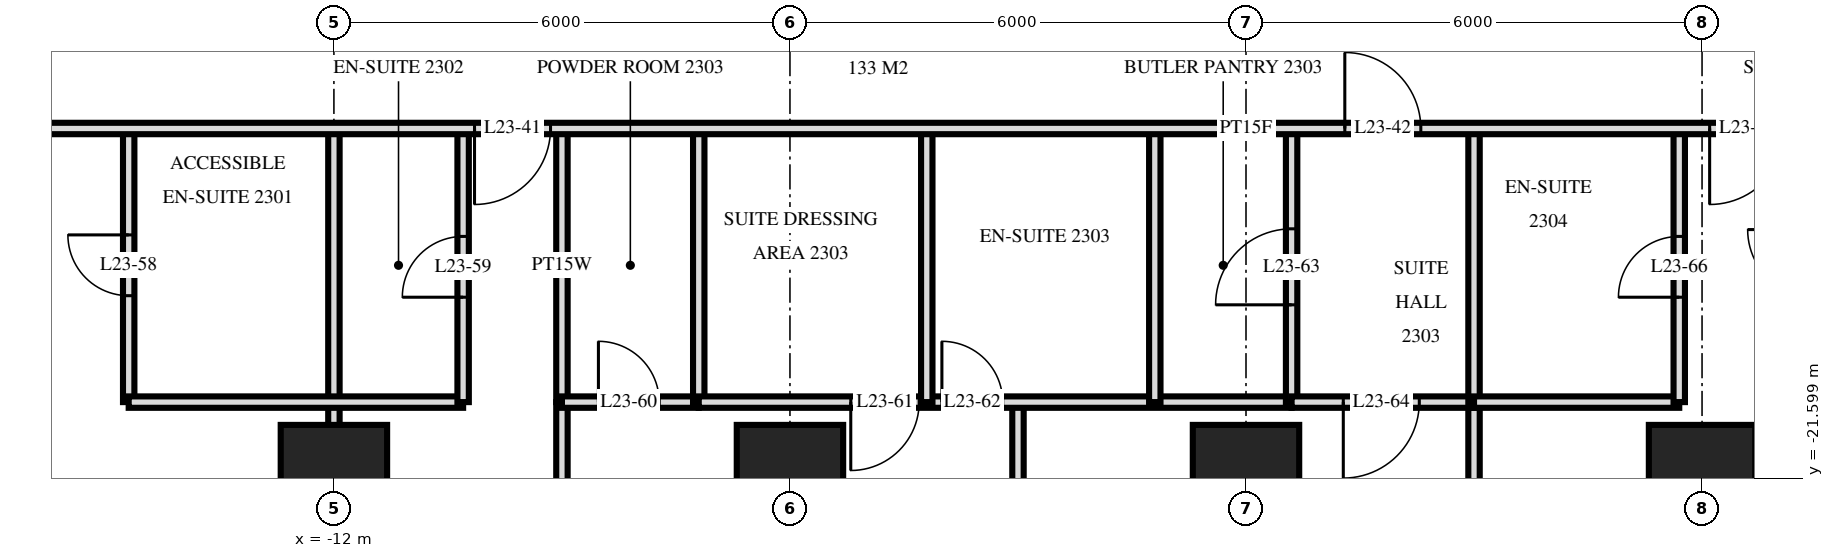
"""IFC4 building model, lengths in metres.
Left out: names, types, materials, properties, quantities, classifications, styles, units other than length and angle.
Written with IfcOpenShell. Run it as: python <this file> out.ifc"""

import sys

from ifc_helpers import new_model, si_unit, direction, frame, frame_2d, origin, origin_2d, place, context, subcontext, project, spatial, rectangle, extrude, element, fill, save


model = new_model("IFC4")
c1 = context("Model", 3, precision=1e-05, world=origin(), true_north=direction((0.0, 1.0)))
c2 = subcontext(c1, "Body", "Model", "MODEL_VIEW")
j1 = project(units=[si_unit("LENGTHUNIT", "METRE"), si_unit("PLANEANGLEUNIT", "RADIAN")], contexts=[c1])
p1 = place(None, origin())
s1 = spatial("IfcSite", under=j1, at=p1, CompositionType="ELEMENT")
p2 = place(p1, origin())
s2 = spatial("IfcBuilding", under=s1, at=p2, CompositionType="ELEMENT")
p3 = place(p2, frame((0.0, 0.0, 92.4)))
s3 = spatial("IfcBuildingStorey", under=s2, at=p3, CompositionType="ELEMENT", Elevation=92.4)
for number, where, z_axis, x_axis in (
    (1, (-12.0, -21.6, 0.0), (0.0, 0.0, 1.0), (1.0, 0.0, 0.0)),
    (2, (-6.0, -21.6, 0.0), (0.0, 0.0, 1.0), (1.0, 0.0, 0.0)),
    (3, (0.0, -21.6, 0.0), (0.0, 0.0, 1.0), (1.0, 0.0, 0.0)),
    (4, (6.0, -21.6, 0.0), (0.0, 0.0, 1.0), (1.0, 0.0, 0.0)),
):
    element("IfcColumn", number, at=place(p3, frame(where, z_axis=z_axis, x_axis=x_axis)), inside=s3, PredefinedType="COLUMN", context=c2, shape_type="SweptSolid", body=[
        extrude(rectangle(XDim=1.4, YDim=1.4, at=origin_2d()), origin(), (0.0, 0.0, 1.0), 3.6),
    ])
p4 = place(p3, frame((5.7, -20.6, 0.0), z_axis=(0.0, 0.0, 1.0), x_axis=(0.0, 1.0, 0.0)))
e5 = element("IfcWall", 5, at=p4, inside=s3, PredefinedType="PARTITIONING", context=c2, shape_type="SweptSolid", body=[
    extrude(rectangle(XDim=3.6, YDim=0.15, at=frame_2d((1.8, 0.0))), origin(), (0.0, 0.0, 1.0), 3.32),
])
p5 = place(p4, frame((1.38, 0.0, 0.0)))
e6 = element("IfcOpeningElement", 6, at=p5, cuts=e5, PredefinedType="OPENING", context=c2, shape_type="SweptSolid", body=[
    extrude(rectangle(XDim=0.8, YDim=2.1, at=frame_2d((0.4, 1.05))), frame((0.0, 0.085, 0.0), z_axis=(0.0, -1.0, 0.0), x_axis=(1.0, 0.0, 0.0)), (0.0, 0.0, 1.0), 0.17),
])
p6 = place(p3, frame((3.0, -20.6, 0.0), z_axis=(0.0, 0.0, 1.0), x_axis=(0.0, 1.0, 0.0)))
e7 = element("IfcWall", 7, at=p6, inside=s3, PredefinedType="PARTITIONING", context=c2, shape_type="SweptSolid", body=[
    extrude(rectangle(XDim=3.6, YDim=0.15, at=frame_2d((1.8, 0.0))), origin(), (0.0, 0.0, 1.0), 3.32),
])
p7 = place(p3, frame((3.0, -29.22, 0.0), z_axis=(0.0, 0.0, 1.0), x_axis=(0.0, 1.0, 0.0)))
e8 = element("IfcWall", 8, at=p7, inside=s3, PredefinedType="PARTITIONING", context=c2, shape_type="SweptSolid", body=[
    extrude(rectangle(XDim=8.62, YDim=0.15, at=frame_2d((4.31, 0.0))), origin(), (0.0, 0.0, 1.0), 3.32),
])
p8 = place(p3, frame((0.6, -20.6, 0.0), z_axis=(0.0, 0.0, 1.0), x_axis=(0.0, 1.0, 0.0)))
e9 = element("IfcWall", 9, at=p8, inside=s3, PredefinedType="PARTITIONING", context=c2, shape_type="SweptSolid", body=[
    extrude(rectangle(XDim=3.6, YDim=0.15, at=frame_2d((1.8, 0.0))), origin(), (0.0, 0.0, 1.0), 3.32),
])
p9 = place(p8, frame((1.28, 0.0, 0.0)))
e10 = element("IfcOpeningElement", 10, at=p9, cuts=e9, PredefinedType="OPENING", context=c2, shape_type="SweptSolid", body=[
    extrude(rectangle(XDim=1.0, YDim=2.1, at=frame_2d((0.5, 1.05))), frame((0.0, 0.085, 0.0), z_axis=(0.0, -1.0, 0.0), x_axis=(1.0, 0.0, 0.0)), (0.0, 0.0, 1.0), 0.17),
])
p10 = place(p3, frame((-1.2, -20.6, 0.0), z_axis=(0.0, 0.0, 1.0), x_axis=(0.0, 1.0, 0.0)))
e11 = element("IfcWall", 11, at=p10, inside=s3, PredefinedType="PARTITIONING", context=c2, shape_type="SweptSolid", body=[
    extrude(rectangle(XDim=3.6, YDim=0.15, at=frame_2d((1.8, 0.0))), origin(), (0.0, 0.0, 1.0), 3.32),
])
p11 = place(p3, frame((-3.0, -29.22, 0.0), z_axis=(0.0, 0.0, 1.0), x_axis=(0.0, 1.0, 0.0)))
e12 = element("IfcWall", 12, at=p11, inside=s3, PredefinedType="PARTITIONING", context=c2, shape_type="SweptSolid", body=[
    extrude(rectangle(XDim=8.62, YDim=0.15, at=frame_2d((4.31, 0.0))), origin(), (0.0, 0.0, 1.0), 3.32),
])
p12 = place(p11, frame((3.77, 0.0, 0.0)))
e13 = element("IfcOpeningElement", 13, at=p12, cuts=e12, PredefinedType="OPENING", context=c2, shape_type="SweptSolid", body=[
    extrude(rectangle(XDim=0.9, YDim=2.1, at=frame_2d((0.45, 1.05))), frame((0.0, 0.085, 0.0), z_axis=(0.0, -1.0, 0.0), x_axis=(1.0, 0.0, 0.0)), (0.0, 0.0, 1.0), 0.17),
])
p13 = place(p3, frame((-4.2, -20.6, 0.0), z_axis=(0.0, 0.0, 1.0), x_axis=(0.0, 1.0, 0.0)))
e14 = element("IfcWall", 14, at=p13, inside=s3, PredefinedType="PARTITIONING", context=c2, shape_type="SweptSolid", body=[
    extrude(rectangle(XDim=3.6, YDim=0.15, at=frame_2d((1.8, 0.0))), origin(), (0.0, 0.0, 1.0), 3.32),
])
p14 = place(p3, frame((-7.2, -20.6, 0.0), z_axis=(0.0, 0.0, 1.0), x_axis=(0.0, 1.0, 0.0)))
e15 = element("IfcWall", 15, at=p14, inside=s3, PredefinedType="PLUMBINGWALL", context=c2, shape_type="SweptSolid", body=[
    extrude(rectangle(XDim=3.6, YDim=0.15, at=frame_2d((1.8, 0.0))), origin(), (0.0, 0.0, 1.0), 3.32),
])
p15 = place(p3, frame((-9.0, -29.22, 0.0), z_axis=(0.0, 0.0, 1.0), x_axis=(0.0, 1.0, 0.0)))
e16 = element("IfcWall", 16, at=p15, inside=s3, PredefinedType="PARTITIONING", context=c2, shape_type="SweptSolid", body=[
    extrude(rectangle(XDim=8.62, YDim=0.15, at=frame_2d((4.31, 0.0))), origin(), (0.0, 0.0, 1.0), 3.32),
])
p16 = place(p3, frame((-9.0, -20.6, 0.0), z_axis=(0.0, 0.0, 1.0), x_axis=(0.0, 1.0, 0.0)))
e17 = element("IfcWall", 17, at=p16, inside=s3, PredefinedType="PLUMBINGWALL", context=c2, shape_type="SweptSolid", body=[
    extrude(rectangle(XDim=3.6, YDim=0.15, at=frame_2d((1.8, 0.0))), origin(), (0.0, 0.0, 1.0), 3.32),
])
p17 = place(p3, frame((-10.3, -20.6, 0.0), z_axis=(0.0, 0.0, 1.0), x_axis=(0.0, 1.0, 0.0)))
e18 = element("IfcWall", 18, at=p17, inside=s3, PredefinedType="PARTITIONING", context=c2, shape_type="SweptSolid", body=[
    extrude(rectangle(XDim=3.6, YDim=0.15, at=frame_2d((1.8, 0.0))), origin(), (0.0, 0.0, 1.0), 3.32),
])
p18 = place(p17, frame((1.38, 0.0, 0.0)))
e19 = element("IfcOpeningElement", 19, at=p18, cuts=e18, PredefinedType="OPENING", context=c2, shape_type="SweptSolid", body=[
    extrude(rectangle(XDim=0.8, YDim=2.1, at=frame_2d((0.4, 1.05))), frame((0.0, 0.085, 0.0), z_axis=(0.0, -1.0, 0.0), x_axis=(1.0, 0.0, 0.0)), (0.0, 0.0, 1.0), 0.17),
])
p19 = place(p3, frame((-12.0, -29.22, 0.0), z_axis=(0.0, 0.0, 1.0), x_axis=(0.0, 1.0, 0.0)))
e20 = element("IfcWall", 20, at=p19, inside=s3, PredefinedType="PARTITIONING", context=c2, shape_type="SweptSolid", body=[
    extrude(rectangle(XDim=12.22, YDim=0.15, at=frame_2d((6.11, 0.0))), origin(), (0.0, 0.0, 1.0), 3.32),
])
p20 = place(p3, frame((-14.7, -20.6, 0.0), z_axis=(0.0, 0.0, 1.0), x_axis=(0.0, 1.0, 0.0)))
e21 = element("IfcWall", 21, at=p20, inside=s3, PredefinedType="PARTITIONING", context=c2, shape_type="SweptSolid", body=[
    extrude(rectangle(XDim=3.6, YDim=0.15, at=frame_2d((1.8, 0.0))), origin(), (0.0, 0.0, 1.0), 3.32),
])
p21 = place(p20, frame((1.4, 0.0, 0.0)))
e22 = element("IfcOpeningElement", 22, at=p21, cuts=e21, PredefinedType="OPENING", context=c2, shape_type="SweptSolid", body=[
    extrude(rectangle(XDim=0.8, YDim=2.1, at=frame_2d((0.4, 1.05))), frame((0.0, 0.085, 0.0), z_axis=(0.0, -1.0, 0.0), x_axis=(1.0, 0.0, 0.0)), (0.0, 0.0, 1.0), 0.17),
])
p22 = place(p3, frame((0.6, -20.6, 0.0), z_axis=(0.0, 0.0, 1.0), x_axis=(1.0, 0.0, 0.0)))
e23 = element("IfcWall", 23, at=p22, inside=s3, PredefinedType="PARTITIONING", context=c2, shape_type="SweptSolid", body=[
    extrude(rectangle(XDim=2.4, YDim=0.15, at=frame_2d((1.2, 0.0))), origin(), (0.0, 0.0, 1.0), 3.32),
])
p23 = place(p22, frame((0.68, 0.0, 0.0)))
e24 = element("IfcOpeningElement", 24, at=p23, cuts=e23, PredefinedType="OPENING", context=c2, shape_type="SweptSolid", body=[
    extrude(rectangle(XDim=1.0, YDim=2.1, at=frame_2d((0.5, 1.05))), frame((0.0, 0.085, 0.0), z_axis=(0.0, -1.0, 0.0), x_axis=(1.0, 0.0, 0.0)), (0.0, 0.0, 1.0), 0.17),
])
p24 = place(p3, frame((-14.7, -20.6, 0.0), z_axis=(0.0, 0.0, 1.0), x_axis=(1.0, 0.0, 0.0)))
e25 = element("IfcWall", 25, at=p24, inside=s3, PredefinedType="PARTITIONING", context=c2, shape_type="SweptSolid", body=[
    extrude(rectangle(XDim=4.4, YDim=0.15, at=frame_2d((2.2, 0.0))), origin(), (0.0, 0.0, 1.0), 3.32),
])
p25 = place(p3, frame((-7.2, -20.6, 0.0), z_axis=(0.0, 0.0, 1.0), x_axis=(1.0, 0.0, 0.0)))
e26 = element("IfcWall", 26, at=p25, inside=s3, PredefinedType="PARTITIONING", context=c2, shape_type="SweptSolid", body=[
    extrude(rectangle(XDim=7.8, YDim=0.15, at=frame_2d((3.9, 0.0))), origin(), (0.0, 0.0, 1.0), 3.32),
])
p26 = place(p25, frame((2.0, 0.0, 0.0)))
e27 = element("IfcOpeningElement", 27, at=p26, cuts=e26, PredefinedType="OPENING", context=c2, shape_type="SweptSolid", body=[
    extrude(rectangle(XDim=0.9, YDim=2.1, at=frame_2d((0.45, 1.05))), frame((0.0, 0.085, 0.0), z_axis=(0.0, -1.0, 0.0), x_axis=(1.0, 0.0, 0.0)), (0.0, 0.0, 1.0), 0.17),
])
p27 = place(p25, frame((3.199, 0.0, 0.0)))
e28 = element("IfcOpeningElement", 28, at=p27, cuts=e26, PredefinedType="OPENING", context=c2, shape_type="SweptSolid", body=[
    extrude(rectangle(XDim=0.8, YDim=2.1, at=frame_2d((0.4, 1.05))), frame((0.0, 0.085, 0.0), z_axis=(0.0, -1.0, 0.0), x_axis=(1.0, 0.0, 0.0)), (0.0, 0.0, 1.0), 0.17),
])
p28 = place(p3, frame((3.0, -20.6, 0.0), z_axis=(0.0, 0.0, 1.0), x_axis=(1.0, 0.0, 0.0)))
e29 = element("IfcWall", 29, at=p28, inside=s3, PredefinedType="PARTITIONING", context=c2, shape_type="SweptSolid", body=[
    extrude(rectangle(XDim=2.7, YDim=0.15, at=frame_2d((1.35, 0.0))), origin(), (0.0, 0.0, 1.0), 3.32),
])
p29 = place(p3, frame((-9.0, -20.6, 0.0), z_axis=(0.0, 0.0, 1.0), x_axis=(1.0, 0.0, 0.0)))
e30 = element("IfcWall", 30, at=p29, inside=s3, PredefinedType="PLUMBINGWALL", context=c2, shape_type="SweptSolid", body=[
    extrude(rectangle(XDim=1.8, YDim=0.15, at=frame_2d((0.9, 0.0))), origin(), (0.0, 0.0, 1.0), 3.32),
])
p30 = place(p29, frame((0.48, 0.0, 0.0)))
e31 = element("IfcOpeningElement", 31, at=p30, cuts=e30, PredefinedType="OPENING", context=c2, shape_type="SweptSolid", body=[
    extrude(rectangle(XDim=0.8, YDim=2.1, at=frame_2d((0.4, 1.05))), frame((0.0, 0.085, 0.0), z_axis=(0.0, -1.0, 0.0), x_axis=(1.0, 0.0, 0.0)), (0.0, 0.0, 1.0), 0.17),
])
p31 = place(p3, frame((-33.12, -17.0, 0.0), z_axis=(0.0, 0.0, 1.0), x_axis=(1.0, 0.0, 0.0)))
e32 = element("IfcWall", 32, at=p31, inside=s3, PredefinedType="PARTITIONING", context=c2, shape_type="SweptSolid", body=[
    extrude(rectangle(XDim=66.24, YDim=0.15, at=frame_2d((33.12, 0.0))), origin(), (0.0, 0.0, 1.0), 3.32),
])
p32 = place(p31, frame((16.27, 0.0, 0.0)))
e33 = element("IfcOpeningElement", 33, at=p32, cuts=e32, PredefinedType="OPENING", context=c2, shape_type="SweptSolid", body=[
    extrude(rectangle(XDim=1.0, YDim=2.1, at=frame_2d((0.5, 1.05))), frame((0.0, 0.085, 0.0), z_axis=(0.0, -1.0, 0.0), x_axis=(1.0, 0.0, 0.0)), (0.0, 0.0, 1.0), 0.17),
])
p33 = place(p31, frame((22.97, 0.0, 0.0)))
e34 = element("IfcOpeningElement", 34, at=p33, cuts=e32, PredefinedType="OPENING", context=c2, shape_type="SweptSolid", body=[
    extrude(rectangle(XDim=1.0, YDim=2.1, at=frame_2d((0.5, 1.05))), frame((0.0, 0.085, 0.0), z_axis=(0.0, -1.0, 0.0), x_axis=(1.0, 0.0, 0.0)), (0.0, 0.0, 1.0), 0.17),
])
p34 = place(p31, frame((34.42, 0.0, 0.0)))
e35 = element("IfcOpeningElement", 35, at=p34, cuts=e32, PredefinedType="OPENING", context=c2, shape_type="SweptSolid", body=[
    extrude(rectangle(XDim=1.0, YDim=2.1, at=frame_2d((0.5, 1.05))), frame((0.0, 0.085, 0.0), z_axis=(0.0, -1.0, 0.0), x_axis=(1.0, 0.0, 0.0)), (0.0, 0.0, 1.0), 0.17),
])
p35 = place(p31, frame((39.22, 0.0, 0.0)))
e36 = element("IfcOpeningElement", 36, at=p35, cuts=e32, PredefinedType="OPENING", context=c2, shape_type="SweptSolid", body=[
    extrude(rectangle(XDim=1.0, YDim=2.1, at=frame_2d((0.5, 1.05))), frame((0.0, 0.085, 0.0), z_axis=(0.0, -1.0, 0.0), x_axis=(1.0, 0.0, 0.0)), (0.0, 0.0, 1.0), 0.17),
])
p36 = place(p31, frame((42.27, 0.0, 0.0)))
e37 = element("IfcOpeningElement", 37, at=p36, cuts=e32, PredefinedType="OPENING", context=c2, shape_type="SweptSolid", body=[
    extrude(rectangle(XDim=1.0, YDim=2.1, at=frame_2d((0.5, 1.05))), frame((0.0, 0.085, 0.0), z_axis=(0.0, -1.0, 0.0), x_axis=(1.0, 0.0, 0.0)), (0.0, 0.0, 1.0), 0.17),
])
p37 = place(p31, frame((45.82, 0.0, 0.0)))
e38 = element("IfcOpeningElement", 38, at=p37, cuts=e32, PredefinedType="OPENING", context=c2, shape_type="SweptSolid", body=[
    extrude(rectangle(XDim=1.0, YDim=2.1, at=frame_2d((0.5, 1.05))), frame((0.0, 0.085, 0.0), z_axis=(0.0, -1.0, 0.0), x_axis=(1.0, 0.0, 0.0)), (0.0, 0.0, 1.0), 0.17),
])
p38 = place(p31, frame((13.42, 0.0, 0.0)))
e39 = element("IfcOpeningElement", 39, at=p38, cuts=e32, PredefinedType="OPENING", context=c2, shape_type="SweptSolid", body=[
    extrude(rectangle(XDim=1.0, YDim=2.1, at=frame_2d((0.5, 1.05))), frame((0.0, 0.085, 0.0), z_axis=(0.0, -1.0, 0.0), x_axis=(1.0, 0.0, 0.0)), (0.0, 0.0, 1.0), 0.17),
])
p39 = place(p31, frame((54.82, 0.0, 0.0)))
e40 = element("IfcOpeningElement", 40, at=p39, cuts=e32, PredefinedType="OPENING", context=c2, shape_type="SweptSolid", body=[
    extrude(rectangle(XDim=1.0, YDim=2.1, at=frame_2d((0.5, 1.05))), frame((0.0, 0.085, 0.0), z_axis=(0.0, -1.0, 0.0), x_axis=(1.0, 0.0, 0.0)), (0.0, 0.0, 1.0), 0.17),
])
p40 = place(p33, frame((0.5, 0.0, 0.0), z_axis=(0.0, 0.0, 1.0), x_axis=(-1.0, 0.0, 0.0)))
e41 = element("IfcDoor", 41, at=p40, inside=s3, OperationType="SINGLE_SWING_LEFT", PredefinedType="DOOR", context=c2, shape_type="SweptSolid", body=[
    extrude(rectangle(XDim=1.0, YDim=2.1, at=frame_2d((0.0, 1.05))), frame((0.0, -0.025, 0.0), z_axis=(0.0, 1.0, 0.0), x_axis=(-1.0, 0.0, 0.0)), (0.0, 0.0, 1.0), 0.05),
])
fill(e34, e41)
p41 = place(p34, origin())
e42 = element("IfcDoor", 42, at=p41, inside=s3, OperationType="SINGLE_SWING_RIGHT", PredefinedType="DOOR", context=c2, shape_type="SweptSolid", body=[
    extrude(rectangle(XDim=1.0, YDim=2.1, at=frame_2d((0.5, 1.05))), frame((0.0, 0.025, 0.0), z_axis=(0.0, -1.0, 0.0), x_axis=(1.0, 0.0, 0.0)), (0.0, 0.0, 1.0), 0.05),
])
fill(e35, e42)
p42 = place(p35, frame((0.5, 0.0, 0.0), z_axis=(0.0, 0.0, 1.0), x_axis=(-1.0, 0.0, 0.0)))
e43 = element("IfcDoor", 43, at=p42, inside=s3, OperationType="SINGLE_SWING_LEFT", PredefinedType="DOOR", context=c2, shape_type="SweptSolid", body=[
    extrude(rectangle(XDim=1.0, YDim=2.1, at=frame_2d((0.0, 1.05))), frame((0.0, -0.025, 0.0), z_axis=(0.0, 1.0, 0.0), x_axis=(-1.0, 0.0, 0.0)), (0.0, 0.0, 1.0), 0.05),
])
fill(e36, e43)
p43 = place(p21, origin())
e44 = element("IfcDoor", 44, at=p43, inside=s3, OperationType="SINGLE_SWING_LEFT", PredefinedType="DOOR", context=c2, shape_type="SweptSolid", body=[
    extrude(rectangle(XDim=0.8, YDim=2.1, at=frame_2d((0.4, 1.05))), frame((0.0, 0.025, 0.0), z_axis=(0.0, -1.0, 0.0), x_axis=(1.0, 0.0, 0.0)), (0.0, 0.0, 1.0), 0.05),
])
fill(e22, e44)
p44 = place(p18, origin())
e45 = element("IfcDoor", 45, at=p44, inside=s3, OperationType="SINGLE_SWING_RIGHT", PredefinedType="DOOR", context=c2, shape_type="SweptSolid", body=[
    extrude(rectangle(XDim=0.8, YDim=2.1, at=frame_2d((0.4, 1.05))), frame((0.0, 0.025, 0.0), z_axis=(0.0, -1.0, 0.0), x_axis=(1.0, 0.0, 0.0)), (0.0, 0.0, 1.0), 0.05),
])
fill(e19, e45)
p45 = place(p30, origin())
e46 = element("IfcDoor", 46, at=p45, inside=s3, OperationType="SINGLE_SWING_RIGHT", PredefinedType="DOOR", context=c2, shape_type="SweptSolid", body=[
    extrude(rectangle(XDim=0.8, YDim=2.1, at=frame_2d((0.4, 1.05))), frame((0.0, 0.025, 0.0), z_axis=(0.0, -1.0, 0.0), x_axis=(1.0, 0.0, 0.0)), (0.0, 0.0, 1.0), 0.05),
])
fill(e31, e46)
p46 = place(p26, frame((0.45, 0.0, 0.0), z_axis=(0.0, 0.0, 1.0), x_axis=(-1.0, 0.0, 0.0)))
e47 = element("IfcDoor", 47, at=p46, inside=s3, OperationType="SINGLE_SWING_LEFT", PredefinedType="DOOR", context=c2, shape_type="SweptSolid", body=[
    extrude(rectangle(XDim=0.9, YDim=2.1, at=frame_2d((0.0, 1.05))), frame((0.0, -0.025, 0.0), z_axis=(0.0, 1.0, 0.0), x_axis=(-1.0, 0.0, 0.0)), (0.0, 0.0, 1.0), 0.05),
])
fill(e27, e47)
p47 = place(p27, origin())
e48 = element("IfcDoor", 48, at=p47, inside=s3, OperationType="SINGLE_SWING_RIGHT", PredefinedType="DOOR", context=c2, shape_type="SweptSolid", body=[
    extrude(rectangle(XDim=0.8, YDim=2.1, at=frame_2d((0.4, 1.05))), frame((0.0, 0.025, 0.0), z_axis=(0.0, -1.0, 0.0), x_axis=(1.0, 0.0, 0.0)), (0.0, 0.0, 1.0), 0.05),
])
fill(e28, e48)
p48 = place(p9, origin())
e49 = element("IfcDoor", 49, at=p48, inside=s3, OperationType="SINGLE_SWING_RIGHT", PredefinedType="DOOR", context=c2, shape_type="SweptSolid", body=[
    extrude(rectangle(XDim=1.0, YDim=2.1, at=frame_2d((0.5, 1.05))), frame((0.0, 0.025, 0.0), z_axis=(0.0, -1.0, 0.0), x_axis=(1.0, 0.0, 0.0)), (0.0, 0.0, 1.0), 0.05),
])
fill(e10, e49)
p49 = place(p23, frame((0.5, 0.0, 0.0), z_axis=(0.0, 0.0, 1.0), x_axis=(-1.0, 0.0, 0.0)))
e50 = element("IfcDoor", 50, at=p49, inside=s3, OperationType="SINGLE_SWING_LEFT", PredefinedType="DOOR", context=c2, shape_type="SweptSolid", body=[
    extrude(rectangle(XDim=1.0, YDim=2.1, at=frame_2d((0.0, 1.05))), frame((0.0, -0.025, 0.0), z_axis=(0.0, 1.0, 0.0), x_axis=(-1.0, 0.0, 0.0)), (0.0, 0.0, 1.0), 0.05),
])
fill(e24, e50)
p50 = place(p5, origin())
e51 = element("IfcDoor", 51, at=p50, inside=s3, OperationType="SINGLE_SWING_RIGHT", PredefinedType="DOOR", context=c2, shape_type="SweptSolid", body=[
    extrude(rectangle(XDim=0.8, YDim=2.1, at=frame_2d((0.4, 1.05))), frame((0.0, 0.025, 0.0), z_axis=(0.0, -1.0, 0.0), x_axis=(1.0, 0.0, 0.0)), (0.0, 0.0, 1.0), 0.05),
])
fill(e6, e51)
save(model, sys.argv[1])
